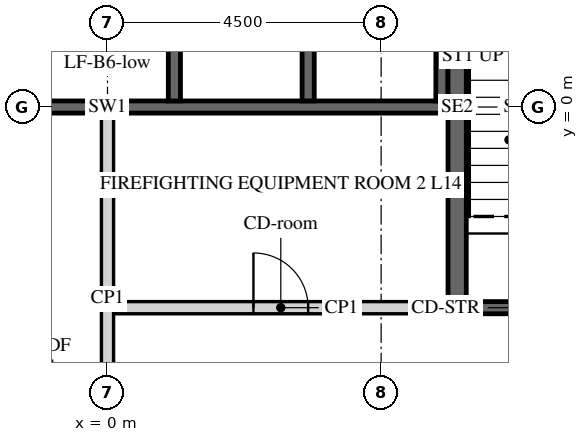
"""IFC4 building model, lengths in metres.
Left out: names, types, materials, properties, quantities, classifications, styles, units other than length and angle.
Written with IfcOpenShell. Run it as: python <this file> out.ifc"""

import sys

from ifc_helpers import new_model, si_unit, direction, frame, frame_2d, origin, place, context, subcontext, project, spatial, polyline, rectangle, outline, extrude, element, fill, save


model = new_model("IFC4")
c1 = context("Model", 3, precision=1e-05, world=origin(), true_north=direction((0.0, 1.0)))
c2 = subcontext(c1, "Body", "Model", "MODEL_VIEW")
j1 = project(units=[si_unit("LENGTHUNIT", "METRE"), si_unit("PLANEANGLEUNIT", "RADIAN")], contexts=[c1])
p1 = place(None, origin())
s1 = spatial("IfcSite", under=j1, at=p1, CompositionType="ELEMENT")
p2 = place(p1, origin())
s2 = spatial("IfcBuilding", under=s1, at=p2, CompositionType="ELEMENT")
p3 = place(p2, frame((0.0, 0.0, 68.7)))
s3 = spatial("IfcBuildingStorey", under=s2, at=p3, CompositionType="ELEMENT", Elevation=68.7)
p4 = place(p3, frame((5.673, -9.825, -0.15), z_axis=(0.0, 0.0, 1.0), x_axis=(0.499995046907, 0.866028263435, 0.0)))
e1 = element("IfcWall", 1, at=p4, inside=s3, PredefinedType="SHEAR", context=c2, shape_type="SweptSolid", body=[
    extrude(outline(polyline([(-0.101, -0.175), (11.446, -0.175), (11.244, 0.175), (0.101, 0.175), (-0.101, -0.175)])), origin(), (0.0, 0.0, 1.0), 3.9),
])
p5 = place(p4, frame((4.801, 0.0, 0.15)))
e2 = element("IfcOpeningElement", 2, at=p5, cuts=e1, PredefinedType="OPENING", context=c2, shape_type="SweptSolid", body=[
    extrude(rectangle(XDim=1.8, YDim=2.4, at=frame_2d((0.9, 1.2))), frame((0.0, 0.185, 0.0), z_axis=(0.0, -1.0, 0.0), x_axis=(1.0, 0.0, 0.0)), (0.0, 0.0, 1.0), 0.37),
])
p6 = place(p3, frame((11.345, 0.0, -0.15), z_axis=(0.0, 0.0, 1.0), x_axis=(-0.499995046907, 0.866028263435, 0.0)))
e3 = element("IfcWall", 3, at=p6, inside=s3, PredefinedType="SHEAR", context=c2, shape_type="SweptSolid", body=[
    extrude(outline(polyline([(-0.101, -0.175), (11.446, -0.175), (11.244, 0.175), (0.101, 0.175), (-0.101, -0.175)])), origin(), (0.0, 0.0, 1.0), 3.9),
])
p7 = place(p6, frame((4.744, 0.0, 0.15)))
e4 = element("IfcOpeningElement", 4, at=p7, cuts=e3, PredefinedType="OPENING", context=c2, shape_type="SweptSolid", body=[
    extrude(rectangle(XDim=1.8, YDim=2.4, at=frame_2d((0.9, 1.2))), frame((0.0, 0.185, 0.0), z_axis=(0.0, -1.0, 0.0), x_axis=(1.0, 0.0, 0.0)), (0.0, 0.0, 1.0), 0.37),
])
p8 = place(p3, frame((-5.6, 0.0, -0.25), z_axis=(0.0, 0.0, 1.0), x_axis=(1.0, 0.0, 0.0)))
e5 = element("IfcWall", 5, at=p8, inside=s3, PredefinedType="SHEAR", context=c2, shape_type="SweptSolid", body=[
    extrude(rectangle(XDim=11.2, YDim=0.2, at=frame_2d((5.6, 0.0))), origin(), (0.0, 0.0, 1.0), 3.9),
])
for number, where, z_axis, x_axis in (
    (6, (1.1, 0.1, -0.25), (0.0, 0.0, 1.0), (0.0, 1.0, 0.0)),
    (7, (3.3, 0.1, -0.25), (0.0, 0.0, 1.0), (0.0, 1.0, 0.0)),
    (8, (5.5, 0.1, -0.25), (0.0, 0.0, 1.0), (0.0, 1.0, 0.0)),
):
    element("IfcWall", number, at=place(p3, frame(where, z_axis=z_axis, x_axis=x_axis)), inside=s3, PredefinedType="SHEAR", context=c2, shape_type="SweptSolid", body=[
        extrude(rectangle(XDim=3.1, YDim=0.2, at=frame_2d((1.55, 0.0))), origin(), (0.0, 0.0, 1.0), 3.9),
    ])
p9 = place(p3, frame((0.1, -3.3, 0.0), z_axis=(0.0, 0.0, 1.0), x_axis=(1.0, 0.0, 0.0)))
e9 = element("IfcWall", 9, at=p9, inside=s3, PredefinedType="PARTITIONING", context=c2, shape_type="SweptSolid", body=[
    extrude(rectangle(XDim=5.5, YDim=0.2, at=frame_2d((2.75, 0.0))), origin(), (0.0, 0.0, 1.0), 3.65),
])
p10 = place(p9, frame((2.3, 0.0, 0.0)))
e10 = element("IfcOpeningElement", 10, at=p10, cuts=e9, PredefinedType="OPENING", context=c2, shape_type="SweptSolid", body=[
    extrude(rectangle(XDim=0.9, YDim=2.1, at=frame_2d((0.45, 1.05))), frame((0.0, 0.11, 0.0), z_axis=(0.0, -1.0, 0.0), x_axis=(1.0, 0.0, 0.0)), (0.0, 0.0, 1.0), 0.22),
])
p11 = place(p3, frame((0.0, -6.2, 0.0), z_axis=(0.0, 0.0, 1.0), x_axis=(0.0, 1.0, 0.0)))
e11 = element("IfcWall", 11, at=p11, inside=s3, PredefinedType="PARTITIONING", context=c2, shape_type="SweptSolid", body=[
    extrude(rectangle(XDim=6.1, YDim=0.2, at=frame_2d((3.05, 0.0))), origin(), (0.0, 0.0, 1.0), 3.65),
])
p12 = place(p3, frame((5.75, -3.4, -0.25), z_axis=(0.0, 0.0, 1.0), x_axis=(0.0, 1.0, 0.0)))
e12 = element("IfcWall", 12, at=p12, inside=s3, PredefinedType="SHEAR", context=c2, shape_type="SweptSolid", body=[
    extrude(rectangle(XDim=6.8, YDim=0.3, at=frame_2d((3.4, 0.0))), origin(), (0.0, 0.0, 1.0), 3.9),
])
p13 = place(p3, frame((5.9, -3.3, -0.25), z_axis=(0.0, 0.0, 1.0), x_axis=(1.0, 0.0, 0.0)))
e13 = element("IfcWall", 13, at=p13, inside=s3, PredefinedType="SHEAR", context=c2, shape_type="SweptSolid", body=[
    extrude(rectangle(XDim=2.95, YDim=0.2, at=frame_2d((1.475, 0.0))), origin(), (0.0, 0.0, 1.0), 3.9),
])
p14 = place(p13, frame((0.875, 0.0, 0.25)))
e14 = element("IfcOpeningElement", 14, at=p14, cuts=e13, PredefinedType="OPENING", context=c2, shape_type="SweptSolid", body=[
    extrude(rectangle(XDim=1.2, YDim=2.4, at=frame_2d((0.6, 1.2))), frame((0.0, 0.11, 0.0), z_axis=(0.0, -1.0, 0.0), x_axis=(1.0, 0.0, 0.0)), (0.0, 0.0, 1.0), 0.22),
])
p15 = place(p10, origin())
e15 = element("IfcDoor", 15, at=p15, inside=s3, OperationType="SINGLE_SWING_LEFT", PredefinedType="DOOR", context=c2, shape_type="SweptSolid", body=[
    extrude(rectangle(XDim=0.9, YDim=2.1, at=frame_2d((0.45, 1.05))), frame((0.0, 0.025, 0.0), z_axis=(0.0, -1.0, 0.0), x_axis=(1.0, 0.0, 0.0)), (0.0, 0.0, 1.0), 0.05),
])
fill(e10, e15)
save(model, sys.argv[1])
